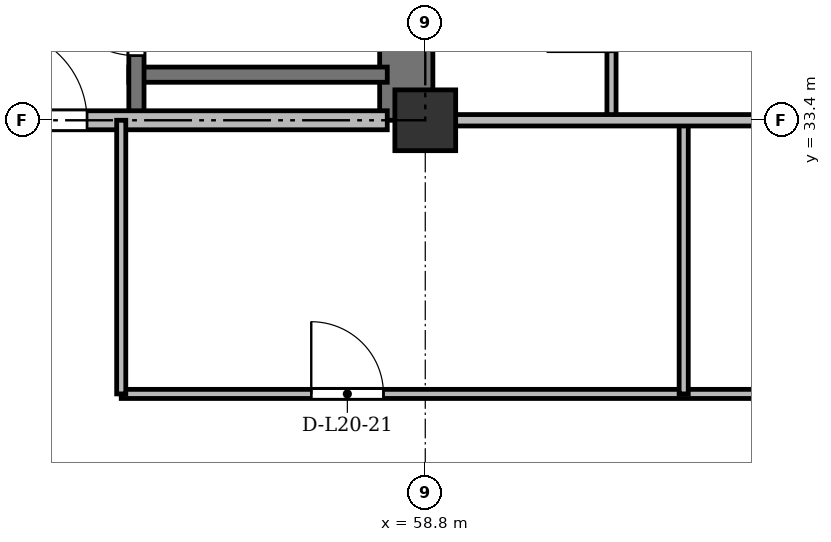
"""IFC4 building model, lengths in metres.
Left out: names, types, materials, properties, quantities, classifications, styles, units other than length and angle.
Written with IfcOpenShell. Run it as: python <this file> out.ifc"""

import sys

from ifc_helpers import new_model, si_unit, direction, frame, frame_2d, origin, origin_2d, place, context, subcontext, project, spatial, rectangle, extrude, source, transform, mapped, element, fill, save


model = new_model("IFC4")
c1 = context("Model", 3, precision=1e-05, world=origin(), true_north=direction((0.0, 1.0)))
c2 = subcontext(c1, "Body", "Model", "MODEL_VIEW")
j1 = project(units=[si_unit("LENGTHUNIT", "METRE"), si_unit("PLANEANGLEUNIT", "RADIAN")], contexts=[c1])
p1 = place(None, origin())
s1 = spatial("IfcSite", under=j1, at=p1, CompositionType="ELEMENT")
p2 = place(p1, origin())
s2 = spatial("IfcBuilding", under=s1, at=p2, CompositionType="ELEMENT")
p3 = place(p2, frame((0.0, 0.0, 81.7)))
s3 = spatial("IfcBuildingStorey", under=s2, at=p3, CompositionType="ELEMENT", Elevation=81.7)
m1 = source(origin(), c2, "Body", "SweptSolid", [
    extrude(rectangle(XDim=0.8, YDim=0.8, at=origin_2d()), origin(), (0.0, 0.0, 1.0), 3.6),
])
p4 = place(p3, frame((58.8, 33.4, 0.0), z_axis=(0.0, 0.0, 1.0), x_axis=(1.0, 0.0, 0.0)))
e1 = element("IfcColumn", 1, at=p4, inside=s3, PredefinedType="COLUMN", context=c2, shape_type="MappedRepresentation", body=[
    mapped(m1, transform((0.0, 0.0, 0.0), x_axis=(1.0, 0.0, 0.0), y_axis=(0.0, 1.0, 0.0), z_axis=(0.0, 0.0, 1.0), scale=1.0)),
])
p5 = place(p3, frame((58.55, 33.4, 0.0), z_axis=(0.0, 0.0, 1.0), x_axis=(0.0, 1.0, 0.0)))
e2 = element("IfcWall", 2, at=p5, inside=s3, PredefinedType="SHEAR", context=c2, shape_type="SweptSolid", body=[
    extrude(rectangle(XDim=11.7, YDim=0.7, at=frame_2d((5.85, 0.0))), origin(), (0.0, 0.0, 1.0), 3.34),
])
p6 = place(p3, frame((54.9, 34.0, 0.0), z_axis=(0.0, 0.0, 1.0), x_axis=(1.0, 0.0, 0.0)))
e3 = element("IfcWall", 3, at=p6, inside=s3, PredefinedType="SHEAR", context=c2, shape_type="SweptSolid", body=[
    extrude(rectangle(XDim=3.4, YDim=0.2, at=frame_2d((1.7, 0.0))), origin(), (0.0, 0.0, 1.0), 3.34),
])
p7 = place(p3, frame((55.0, 33.4, 0.0), z_axis=(0.0, 0.0, 1.0), x_axis=(0.0, 1.0, 0.0)))
e4 = element("IfcWall", 4, at=p7, inside=s3, PredefinedType="SHEAR", context=c2, shape_type="SweptSolid", body=[
    extrude(rectangle(XDim=11.1, YDim=0.2, at=frame_2d((5.55, 0.0))), origin(), (0.0, 0.0, 1.0), 3.34),
])
p8 = place(p7, frame((0.85, 0.0, 0.0)))
e5 = element("IfcOpeningElement", 5, at=p8, cuts=e4, PredefinedType="OPENING", context=c2, shape_type="SweptSolid", body=[
    extrude(rectangle(XDim=1.1, YDim=2.15, at=frame_2d((0.55, 1.075))), frame((0.0, 0.11, 0.0), z_axis=(0.0, -1.0, 0.0), x_axis=(1.0, 0.0, 0.0)), (0.0, 0.0, 1.0), 0.22),
])
p9 = place(p3, frame((47.15, 33.4, 0.0), z_axis=(0.0, 0.0, 1.0), x_axis=(1.0, 0.0, 0.0)))
e6 = element("IfcWall", 6, at=p9, inside=s3, PredefinedType="PARTITIONING", context=c2, shape_type="SweptSolid", body=[
    extrude(rectangle(XDim=11.15, YDim=0.25, at=frame_2d((5.575, 0.0))), origin(), (0.0, 0.0, 1.0), 2.752),
])
p10 = place(p9, frame((0.7, 0.0, 0.0)))
e7 = element("IfcOpeningElement", 7, at=p10, cuts=e6, PredefinedType="OPENING", context=c2, shape_type="SweptSolid", body=[
    extrude(rectangle(XDim=0.95, YDim=2.15, at=frame_2d((0.475, 1.075))), frame((0.0, 0.135, 0.0), z_axis=(0.0, -1.0, 0.0), x_axis=(1.0, 0.0, 0.0)), (0.0, 0.0, 1.0), 0.27),
])
p11 = place(p9, frame((6.0, 0.0, 0.0)))
e8 = element("IfcOpeningElement", 8, at=p11, cuts=e6, PredefinedType="OPENING", context=c2, shape_type="SweptSolid", body=[
    extrude(rectangle(XDim=1.2, YDim=2.15, at=frame_2d((0.6, 1.075))), frame((0.0, 0.135, 0.0), z_axis=(0.0, -1.0, 0.0), x_axis=(1.0, 0.0, 0.0)), (0.0, 0.0, 1.0), 0.27),
])
p12 = place(p3, frame((54.8, 29.8, 0.0), z_axis=(0.0, 0.0, 1.0), x_axis=(1.0, 0.0, 0.0)))
e9 = element("IfcWall", 9, at=p12, inside=s3, PredefinedType="PARTITIONING", context=c2, shape_type="SweptSolid", body=[
    extrude(rectangle(XDim=14.85, YDim=0.12, at=frame_2d((7.425, 0.0))), origin(), (0.0, 0.0, 1.0), 2.84),
])
p13 = place(p12, frame((2.5, 0.0, 0.0)))
e10 = element("IfcOpeningElement", 10, at=p13, cuts=e9, PredefinedType="OPENING", context=c2, shape_type="SweptSolid", body=[
    extrude(rectangle(XDim=0.95, YDim=2.15, at=frame_2d((0.475, 1.075))), frame((0.0, 0.07, 0.0), z_axis=(0.0, -1.0, 0.0), x_axis=(1.0, 0.0, 0.0)), (0.0, 0.0, 1.0), 0.14),
])
p14 = place(p12, frame((9.2, 0.0, 0.0)))
e11 = element("IfcOpeningElement", 11, at=p14, cuts=e9, PredefinedType="OPENING", context=c2, shape_type="SweptSolid", body=[
    extrude(rectangle(XDim=0.95, YDim=2.15, at=frame_2d((0.475, 1.075))), frame((0.0, 0.07, 0.0), z_axis=(0.0, -1.0, 0.0), x_axis=(1.0, 0.0, 0.0)), (0.0, 0.0, 1.0), 0.14),
])
for number, where, z_axis, x_axis in (
    (12, (62.2, 29.8, 0.0), (0.0, 0.0, 1.0), (0.0, 1.0, 0.0)),
    (13, (54.8, 29.8, 0.0), (0.0, 0.0, 1.0), (0.0, 1.0, 0.0)),
):
    element("IfcWall", number, at=place(p3, frame(where, z_axis=z_axis, x_axis=x_axis)), inside=s3, PredefinedType="PARTITIONING", context=c2, shape_type="SweptSolid", body=[
        extrude(rectangle(XDim=3.6, YDim=0.12, at=frame_2d((1.8, 0.0))), origin(), (0.0, 0.0, 1.0), 2.752),
    ])
p15 = place(p3, frame((61.25, 33.4, 0.0), z_axis=(0.0, 0.0, 1.0), x_axis=(0.0, 1.0, 0.0)))
e14 = element("IfcWall", 14, at=p15, inside=s3, PredefinedType="PARTITIONING", context=c2, shape_type="SweptSolid", body=[
    extrude(rectangle(XDim=3.25, YDim=0.12, at=frame_2d((1.625, 0.0))), origin(), (0.0, 0.0, 1.0), 2.752),
])
p16 = place(p15, frame((0.9, 0.0, 0.0)))
e15 = element("IfcOpeningElement", 15, at=p16, cuts=e14, PredefinedType="OPENING", context=c2, shape_type="SweptSolid", body=[
    extrude(rectangle(XDim=0.85, YDim=2.1, at=frame_2d((0.425, 1.05))), frame((0.0, 0.07, 0.0), z_axis=(0.0, -1.0, 0.0), x_axis=(1.0, 0.0, 0.0)), (0.0, 0.0, 1.0), 0.14),
])
p17 = place(p3, frame((58.8, 33.4, 0.0), z_axis=(0.0, 0.0, 1.0), x_axis=(1.0, 0.0, 0.0)))
e16 = element("IfcWall", 16, at=p17, inside=s3, PredefinedType="PARTITIONING", context=c2, shape_type="SweptSolid", body=[
    extrude(rectangle(XDim=10.85, YDim=0.15, at=frame_2d((5.425, 0.0))), origin(), (0.0, 0.0, 1.0), 2.752),
])
p18 = place(p17, frame((4.933, 0.0, 0.0)))
e17 = element("IfcOpeningElement", 17, at=p18, cuts=e16, PredefinedType="OPENING", context=c2, shape_type="SweptSolid", body=[
    extrude(rectangle(XDim=0.95, YDim=2.15, at=frame_2d((0.475, 1.075))), frame((0.0, 0.085, 0.0), z_axis=(0.0, -1.0, 0.0), x_axis=(1.0, 0.0, 0.0)), (0.0, 0.0, 1.0), 0.17),
])
m2 = source(origin(), c2, "Body", "SweptSolid", [
    extrude(rectangle(XDim=1.1, YDim=2.15, at=frame_2d((0.55, 1.075))), frame((0.0, 0.025, 0.0), z_axis=(0.0, -1.0, 0.0), x_axis=(1.0, 0.0, 0.0)), (0.0, 0.0, 1.0), 0.05),
])
p19 = place(p8, origin())
e18 = element("IfcDoor", 18, at=p19, inside=s3, OperationType="SINGLE_SWING_RIGHT", PredefinedType="DOOR", context=c2, shape_type="MappedRepresentation", body=[
    mapped(m2, transform((0.0, 0.0, 0.0), x_axis=(1.0, 0.0, 0.0), y_axis=(0.0, 1.0, 0.0), z_axis=(0.0, 0.0, 1.0), scale=1.0)),
])
fill(e5, e18)
m3 = source(origin(), c2, "Body", "SweptSolid", [
    extrude(rectangle(XDim=1.2, YDim=2.15, at=frame_2d((0.6, 1.075))), frame((0.0, 0.025, 0.0), z_axis=(0.0, -1.0, 0.0), x_axis=(1.0, 0.0, 0.0)), (0.0, 0.0, 1.0), 0.05),
])
p20 = place(p11, origin())
e19 = element("IfcDoor", 19, at=p20, inside=s3, OperationType="SINGLE_SWING_LEFT", PredefinedType="DOOR", context=c2, shape_type="MappedRepresentation", body=[
    mapped(m3, transform((0.0, 0.0, 0.0), x_axis=(1.0, 0.0, 0.0), y_axis=(0.0, 1.0, 0.0), z_axis=(0.0, 0.0, 1.0), scale=1.0)),
])
fill(e8, e19)
m4 = source(origin(), c2, "Body", "SweptSolid", [
    extrude(rectangle(XDim=0.95, YDim=2.15, at=frame_2d((0.475, 1.075))), frame((0.0, 0.025, 0.0), z_axis=(0.0, -1.0, 0.0), x_axis=(1.0, 0.0, 0.0)), (0.0, 0.0, 1.0), 0.05),
])
p21 = place(p13, origin())
e20 = element("IfcDoor", 20, at=p21, inside=s3, OperationType="SINGLE_SWING_LEFT", PredefinedType="DOOR", context=c2, shape_type="MappedRepresentation", body=[
    mapped(m4, transform((0.0, 0.0, 0.0), x_axis=(1.0, 0.0, 0.0), y_axis=(0.0, 1.0, 0.0), z_axis=(0.0, 0.0, 1.0), scale=1.0)),
])
fill(e10, e20)
m5 = source(origin(), c2, "Body", "SweptSolid", [
    extrude(rectangle(XDim=0.85, YDim=2.1, at=frame_2d((0.425, 1.05))), frame((0.0, 0.025, 0.0), z_axis=(0.0, -1.0, 0.0), x_axis=(1.0, 0.0, 0.0)), (0.0, 0.0, 1.0), 0.05),
])
p22 = place(p16, origin())
e21 = element("IfcDoor", 21, at=p22, inside=s3, OperationType="SINGLE_SWING_LEFT", PredefinedType="DOOR", context=c2, shape_type="MappedRepresentation", body=[
    mapped(m5, transform((0.0, 0.0, 0.0), x_axis=(1.0, 0.0, 0.0), y_axis=(0.0, 1.0, 0.0), z_axis=(0.0, 0.0, 1.0), scale=1.0)),
])
fill(e15, e21)
save(model, sys.argv[1])
